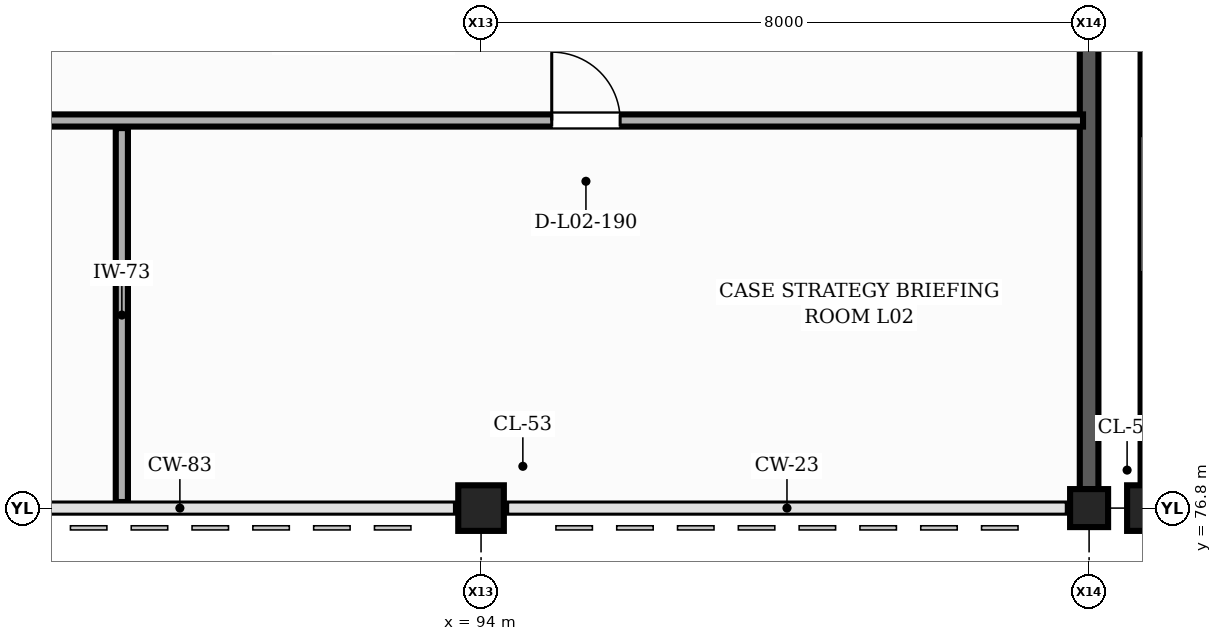
"""IFC4 building model, lengths in metres.
Left out: names, types, materials, properties, quantities, classifications, styles, units other than length and angle.
Written with IfcOpenShell. Run it as: python <this file> out.ifc"""

import sys

from ifc_helpers import new_model, si_unit, direction, frame, frame_2d, origin, origin_2d, place, context, subcontext, project, spatial, rectangle, extrude, element, fill, save


model = new_model("IFC4")
c1 = context("Model", 3, precision=1e-05, world=origin(), true_north=direction((0.0, 1.0)))
c2 = subcontext(c1, "Body", "Model", "MODEL_VIEW")
j1 = project(units=[si_unit("LENGTHUNIT", "METRE"), si_unit("PLANEANGLEUNIT", "RADIAN")], contexts=[c1])
p1 = place(None, origin())
s1 = spatial("IfcSite", under=j1, at=p1, CompositionType="ELEMENT")
p2 = place(p1, origin())
s2 = spatial("IfcBuilding", under=s1, at=p2, CompositionType="ELEMENT")
p3 = place(p2, frame((0.0, 0.0, 9.0)))
s3 = spatial("IfcBuildingStorey", under=s2, at=p3, CompositionType="ELEMENT", Elevation=9.0)
p4 = place(p3, frame((94.0, 76.8, 0.0), z_axis=(0.0, 0.0, 1.0), x_axis=(1.0, 0.0, 0.0)))
e1 = element("IfcColumn", 1, at=p4, inside=s3, PredefinedType="COLUMN", context=c2, shape_type="SweptSolid", body=[
    extrude(rectangle(XDim=0.6, YDim=0.6, at=origin_2d()), origin(), (0.0, 0.0, 1.0), 4.5),
])
p5 = place(p3, frame((102.0, 76.8, 0.0), z_axis=(0.0, 0.0, 1.0), x_axis=(1.0, 0.0, 0.0)))
e2 = element("IfcColumn", 2, at=p5, inside=s3, PredefinedType="COLUMN", context=c2, shape_type="SweptSolid", body=[
    extrude(rectangle(XDim=0.5, YDim=0.5, at=origin_2d()), origin(), (0.0, 0.0, 1.0), 4.5),
])
p6 = place(p3, frame((102.8, 76.8, 0.0), z_axis=(0.0, 0.0, 1.0), x_axis=(1.0, 0.0, 0.0)))
e3 = element("IfcColumn", 3, at=p6, inside=s3, PredefinedType="COLUMN", context=c2, shape_type="SweptSolid", body=[
    extrude(rectangle(XDim=0.6, YDim=0.6, at=origin_2d()), origin(), (0.0, 0.0, 1.0), 4.5),
])
p7 = place(p3, frame((102.0, 77.05, 0.0), z_axis=(0.0, 0.0, 1.0), x_axis=(0.0, 1.0, 0.0)))
e4 = element("IfcWall", 4, at=p7, inside=s3, PredefinedType="SOLIDWALL", context=c2, shape_type="SweptSolid", body=[
    extrude(rectangle(XDim=7.5, YDim=0.245, at=frame_2d((3.75, 0.0))), origin(), (0.0, 0.0, 1.0), 3.57),
])
p8 = place(p3, frame((102.8, 84.5, 0.0), z_axis=(0.0, 0.0, 1.0), x_axis=(0.0, -1.0, 0.0)))
e5 = element("IfcWall", 5, at=p8, inside=s3, PredefinedType="SOLIDWALL", context=c2, shape_type="SweptSolid", body=[
    extrude(rectangle(XDim=7.4, YDim=0.245, at=frame_2d((3.7, 0.0))), origin(), (0.0, 0.0, 1.0), 3.57),
])
p9 = place(p8, frame((2.8, 0.0, 0.9)))
e6 = element("IfcOpeningElement", 6, at=p9, cuts=e5, PredefinedType="OPENING", context=c2, shape_type="SweptSolid", body=[
    extrude(rectangle(XDim=1.8, YDim=1.4, at=frame_2d((0.9, 0.7))), frame((0.0, 0.133, 0.0), z_axis=(0.0, -1.0, 0.0), x_axis=(1.0, 0.0, 0.0)), (0.0, 0.0, 1.0), 0.265),
])
p10 = place(p3, frame((89.274, 76.88, 0.0), z_axis=(0.0, 0.0, 1.0), x_axis=(0.0, 1.0, 0.0)))
e7 = element("IfcWall", 7, at=p10, inside=s3, PredefinedType="PARTITIONING", context=c2, shape_type="SweptSolid", body=[
    extrude(rectangle(XDim=4.92, YDim=0.16, at=frame_2d((2.46, 0.0))), origin(), (0.0, 0.0, 1.0), 3.555),
])
p11 = place(p3, frame((29.3, 81.9, 0.0), z_axis=(0.0, 0.0, 1.0), x_axis=(1.0, 0.0, 0.0)))
e8 = element("IfcWall", 8, at=p11, inside=s3, PredefinedType="PARTITIONING", context=c2, shape_type="SweptSolid", body=[
    extrude(rectangle(XDim=72.62, YDim=0.16, at=frame_2d((36.31, 0.0))), origin(), (0.0, 0.0, 1.0), 3.555),
])
p12 = place(p11, frame((9.06, 0.0, 0.0)))
e9 = element("IfcOpeningElement", 9, at=p12, cuts=e8, PredefinedType="OPENING", context=c2, shape_type="SweptSolid", body=[
    extrude(rectangle(XDim=1.02, YDim=2.12, at=frame_2d((0.51, 1.06))), frame((0.0, 0.09, 0.0), z_axis=(0.0, -1.0, 0.0), x_axis=(1.0, 0.0, 0.0)), (0.0, 0.0, 1.0), 0.18),
])
p13 = place(p11, frame((26.55, 0.0, 0.0)))
e10 = element("IfcOpeningElement", 10, at=p13, cuts=e8, PredefinedType="OPENING", context=c2, shape_type="SweptSolid", body=[
    extrude(rectangle(XDim=1.05, YDim=2.1, at=frame_2d((0.525, 1.05))), frame((0.0, 0.09, 0.0), z_axis=(0.0, -1.0, 0.0), x_axis=(1.0, 0.0, 0.0)), (0.0, 0.0, 1.0), 0.18),
])
p14 = place(p11, frame((39.04, 0.0, 0.0)))
e11 = element("IfcOpeningElement", 11, at=p14, cuts=e8, PredefinedType="OPENING", context=c2, shape_type="SweptSolid", body=[
    extrude(rectangle(XDim=1.08, YDim=2.14, at=frame_2d((0.54, 1.07))), frame((0.0, 0.09, 0.0), z_axis=(0.0, -1.0, 0.0), x_axis=(1.0, 0.0, 0.0)), (0.0, 0.0, 1.0), 0.18),
])
p15 = place(p11, frame((52.03, 0.0, 0.0)))
e12 = element("IfcOpeningElement", 12, at=p15, cuts=e8, PredefinedType="OPENING", context=c2, shape_type="SweptSolid", body=[
    extrude(rectangle(XDim=1.1, YDim=2.1, at=frame_2d((0.55, 1.05))), frame((0.0, 0.09, 0.0), z_axis=(0.0, -1.0, 0.0), x_axis=(1.0, 0.0, 0.0)), (0.0, 0.0, 1.0), 0.18),
])
p16 = place(p11, frame((65.63, 0.0, 0.0)))
e13 = element("IfcOpeningElement", 13, at=p16, cuts=e8, PredefinedType="OPENING", context=c2, shape_type="SweptSolid", body=[
    extrude(rectangle(XDim=0.9, YDim=2.1, at=frame_2d((0.45, 1.05))), frame((0.0, 0.09, 0.0), z_axis=(0.0, -1.0, 0.0), x_axis=(1.0, 0.0, 0.0)), (0.0, 0.0, 1.0), 0.18),
])
p17 = place(p16, origin())
e14 = element("IfcDoor", 14, at=p17, inside=s3, OperationType="SINGLE_SWING_LEFT", PredefinedType="DOOR", context=c2, shape_type="SweptSolid", body=[
    extrude(rectangle(XDim=0.9, YDim=2.1, at=frame_2d((0.45, 1.05))), frame((0.0, 0.025, 0.0), z_axis=(0.0, -1.0, 0.0), x_axis=(1.0, 0.0, 0.0)), (0.0, 0.0, 1.0), 0.05),
])
fill(e13, e14)
save(model, sys.argv[1])
